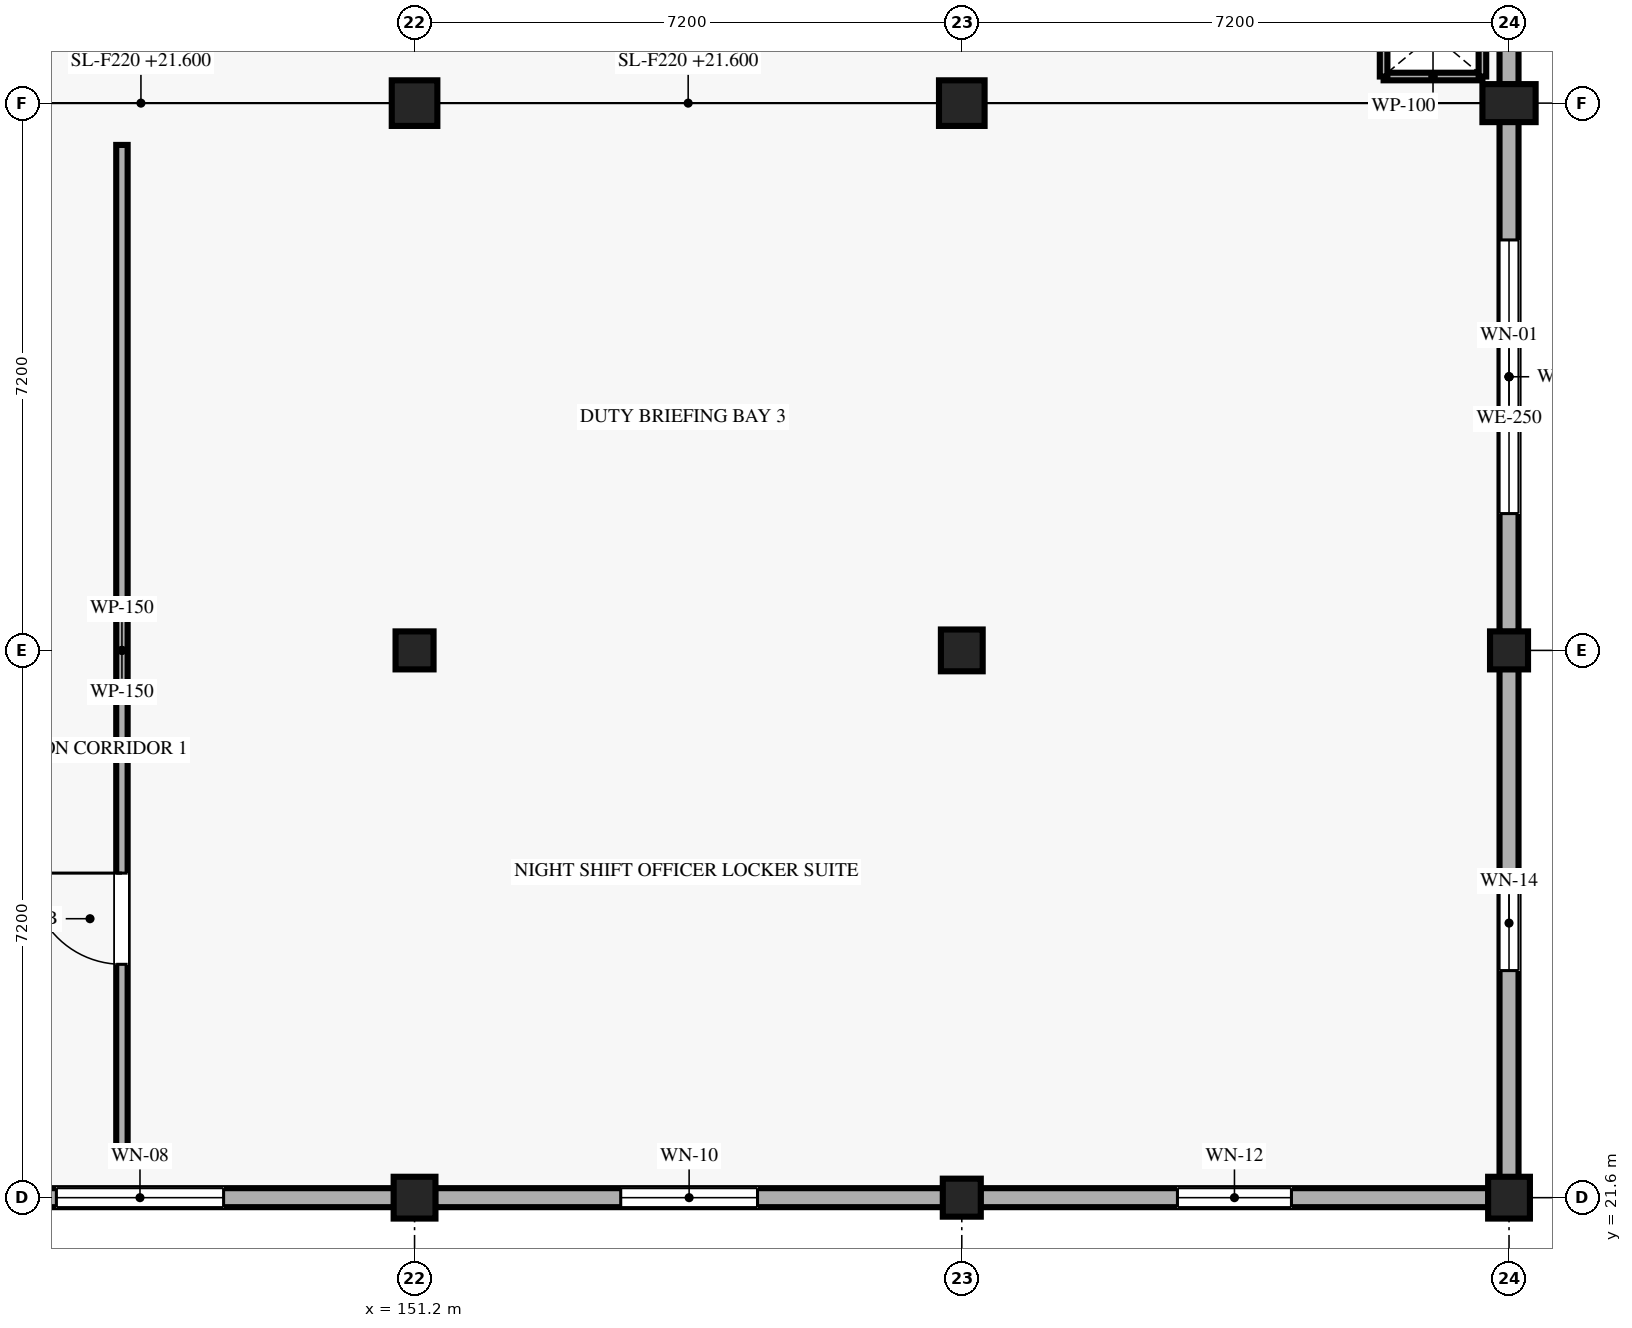
"""IFC4 building model, lengths in metres.
Left out: names, types, materials, properties, quantities, classifications, styles, units other than length and angle.
Written with IfcOpenShell. Run it as: python <this file> out.ifc"""

import sys

from ifc_helpers import new_model, si_unit, direction, frame, frame_2d, origin, origin_2d, place, context, subcontext, project, spatial, rectangle, extrude, element, fill, save


model = new_model("IFC4")
c1 = context("Model", 3, precision=1e-05, world=origin(), true_north=direction((0.0, 1.0)))
c2 = subcontext(c1, "Body", "Model", "MODEL_VIEW")
j1 = project(units=[si_unit("LENGTHUNIT", "METRE"), si_unit("PLANEANGLEUNIT", "RADIAN")], contexts=[c1])
p1 = place(None, origin())
s1 = spatial("IfcSite", under=j1, at=p1, CompositionType="ELEMENT")
p2 = place(p1, origin())
s2 = spatial("IfcBuilding", under=s1, at=p2, CompositionType="ELEMENT")
p3 = place(p2, frame((0.0, 0.0, 21.6)))
s3 = spatial("IfcBuildingStorey", under=s2, at=p3, CompositionType="ELEMENT", Elevation=21.6)
p4 = place(p3, frame((151.2, 21.6, 0.0), z_axis=(0.0, 0.0, 1.0), x_axis=(1.0, 0.0, 0.0)))
e1 = element("IfcColumn", 1, at=p4, inside=s3, PredefinedType="COLUMN", context=c2, shape_type="SweptSolid", body=[
    extrude(rectangle(XDim=0.55, YDim=0.55, at=origin_2d()), origin(), (0.0, 0.0, 1.0), 4.05),
])
p5 = place(p3, frame((151.2, 28.8, 0.0), z_axis=(0.0, 0.0, 1.0), x_axis=(1.0, 0.0, 0.0)))
e2 = element("IfcColumn", 2, at=p5, inside=s3, PredefinedType="COLUMN", context=c2, shape_type="SweptSolid", body=[
    extrude(rectangle(XDim=0.5, YDim=0.5, at=origin_2d()), origin(), (0.0, 0.0, 1.0), 4.05),
])
p6 = place(p3, frame((151.2, 36.0, 0.0), z_axis=(0.0, 0.0, 1.0), x_axis=(1.0, 0.0, 0.0)))
e3 = element("IfcColumn", 3, at=p6, inside=s3, PredefinedType="COLUMN", context=c2, shape_type="SweptSolid", body=[
    extrude(rectangle(XDim=0.6, YDim=0.6, at=origin_2d()), origin(), (0.0, 0.0, 1.0), 4.05),
])
p7 = place(p3, frame((158.4, 21.6, 0.0), z_axis=(0.0, 0.0, 1.0), x_axis=(1.0, 0.0, 0.0)))
e4 = element("IfcColumn", 4, at=p7, inside=s3, PredefinedType="COLUMN", context=c2, shape_type="SweptSolid", body=[
    extrude(rectangle(XDim=0.5, YDim=0.5, at=origin_2d()), origin(), (0.0, 0.0, 1.0), 4.05),
])
p8 = place(p3, frame((158.4, 28.8, 0.0), z_axis=(0.0, 0.0, 1.0), x_axis=(1.0, 0.0, 0.0)))
e5 = element("IfcColumn", 5, at=p8, inside=s3, PredefinedType="COLUMN", context=c2, shape_type="SweptSolid", body=[
    extrude(rectangle(XDim=0.55, YDim=0.55, at=origin_2d()), origin(), (0.0, 0.0, 1.0), 4.05),
])
p9 = place(p3, frame((158.4, 36.0, 0.0), z_axis=(0.0, 0.0, 1.0), x_axis=(1.0, 0.0, 0.0)))
e6 = element("IfcColumn", 6, at=p9, inside=s3, PredefinedType="COLUMN", context=c2, shape_type="SweptSolid", body=[
    extrude(rectangle(XDim=0.6, YDim=0.6, at=origin_2d()), origin(), (0.0, 0.0, 1.0), 4.05),
])
p10 = place(p3, frame((165.6, 21.6, 0.0), z_axis=(0.0, 0.0, 1.0), x_axis=(1.0, 0.0, 0.0)))
e7 = element("IfcColumn", 7, at=p10, inside=s3, PredefinedType="COLUMN", context=c2, shape_type="SweptSolid", body=[
    extrude(rectangle(XDim=0.55, YDim=0.55, at=origin_2d()), origin(), (0.0, 0.0, 1.0), 4.05),
])
p11 = place(p3, frame((165.6, 28.8, 0.0), z_axis=(0.0, 0.0, 1.0), x_axis=(1.0, 0.0, 0.0)))
e8 = element("IfcColumn", 8, at=p11, inside=s3, PredefinedType="COLUMN", context=c2, shape_type="SweptSolid", body=[
    extrude(rectangle(XDim=0.5, YDim=0.5, at=origin_2d()), origin(), (0.0, 0.0, 1.0), 4.05),
])
p12 = place(p3, frame((165.6, 36.0, 0.0), z_axis=(0.0, 0.0, 1.0), x_axis=(0.0, 1.0, 0.0)))
e9 = element("IfcColumn", 9, at=p12, inside=s3, PredefinedType="COLUMN", context=c2, shape_type="SweptSolid", body=[
    extrude(rectangle(XDim=0.5, YDim=0.7, at=origin_2d()), origin(), (0.0, 0.0, 1.0), 4.05),
])
p13 = place(p3, frame((144.245, 21.6, 0.0), z_axis=(0.0, 0.0, 1.0), x_axis=(1.0, 0.0, 0.0)))
e10 = element("IfcWall", 10, at=p13, inside=s3, PredefinedType="SOLIDWALL", context=c2, shape_type="SweptSolid", body=[
    extrude(rectangle(XDim=6.685, YDim=0.25, at=frame_2d((3.342, 0.0))), origin(), (0.0, 0.0, 1.0), 3.295),
])
p14 = place(p13, frame((2.242, 0.0, 0.85)))
e11 = element("IfcOpeningElement", 11, at=p14, cuts=e10, PredefinedType="OPENING", context=c2, shape_type="SweptSolid", body=[
    extrude(rectangle(XDim=2.2, YDim=1.7, at=frame_2d((1.1, 0.85))), frame((0.0, 0.135, 0.0), z_axis=(0.0, -1.0, 0.0), x_axis=(1.0, 0.0, 0.0)), (0.0, 0.0, 1.0), 0.27),
])
p15 = place(p3, frame((151.47, 21.6, 0.0), z_axis=(0.0, 0.0, 1.0), x_axis=(1.0, 0.0, 0.0)))
e12 = element("IfcWall", 12, at=p15, inside=s3, PredefinedType="SOLIDWALL", context=c2, shape_type="SweptSolid", body=[
    extrude(rectangle(XDim=6.685, YDim=0.25, at=frame_2d((3.343, 0.0))), origin(), (0.0, 0.0, 1.0), 3.295),
])
p16 = place(p15, frame((2.442, 0.0, 0.85)))
e13 = element("IfcOpeningElement", 13, at=p16, cuts=e12, PredefinedType="OPENING", context=c2, shape_type="SweptSolid", body=[
    extrude(rectangle(XDim=1.8, YDim=1.6, at=frame_2d((0.9, 0.8))), frame((0.0, 0.135, 0.0), z_axis=(0.0, -1.0, 0.0), x_axis=(1.0, 0.0, 0.0)), (0.0, 0.0, 1.0), 0.27),
])
p17 = place(p3, frame((158.645, 21.6, 0.0), z_axis=(0.0, 0.0, 1.0), x_axis=(1.0, 0.0, 0.0)))
e14 = element("IfcWall", 14, at=p17, inside=s3, PredefinedType="SOLIDWALL", context=c2, shape_type="SweptSolid", body=[
    extrude(rectangle(XDim=6.685, YDim=0.25, at=frame_2d((3.343, 0.0))), origin(), (0.0, 0.0, 1.0), 3.295),
])
p18 = place(p17, frame((2.593, 0.0, 0.85)))
e15 = element("IfcOpeningElement", 15, at=p18, cuts=e14, PredefinedType="OPENING", context=c2, shape_type="SweptSolid", body=[
    extrude(rectangle(XDim=1.5, YDim=2.05, at=frame_2d((0.75, 1.025))), frame((0.0, 0.135, 0.0), z_axis=(0.0, -1.0, 0.0), x_axis=(1.0, 0.0, 0.0)), (0.0, 0.0, 1.0), 0.27),
])
p19 = place(p3, frame((165.6, 21.87, 0.0), z_axis=(0.0, 0.0, 1.0), x_axis=(0.0, 1.0, 0.0)))
e16 = element("IfcWall", 16, at=p19, inside=s3, PredefinedType="SOLIDWALL", context=c2, shape_type="SweptSolid", body=[
    extrude(rectangle(XDim=6.685, YDim=0.25, at=frame_2d((3.342, 0.0))), origin(), (0.0, 0.0, 1.0), 3.295),
])
p20 = place(p19, frame((2.718, 0.0, 0.85)))
e17 = element("IfcOpeningElement", 17, at=p20, cuts=e16, PredefinedType="OPENING", context=c2, shape_type="SweptSolid", body=[
    extrude(rectangle(XDim=1.25, YDim=1.5, at=frame_2d((0.625, 0.75))), frame((0.0, 0.135, 0.0), z_axis=(0.0, -1.0, 0.0), x_axis=(1.0, 0.0, 0.0)), (0.0, 0.0, 1.0), 0.27),
])
p21 = place(p3, frame((165.6, 29.045, 0.0), z_axis=(0.0, 0.0, 1.0), x_axis=(0.0, 1.0, 0.0)))
e18 = element("IfcWall", 18, at=p21, inside=s3, PredefinedType="SOLIDWALL", context=c2, shape_type="SweptSolid", body=[
    extrude(rectangle(XDim=6.71, YDim=0.25, at=frame_2d((3.355, 0.0))), origin(), (0.0, 0.0, 1.0), 3.295),
])
p22 = place(p21, frame((1.555, 0.0, 0.85)))
e19 = element("IfcOpeningElement", 19, at=p22, cuts=e18, PredefinedType="OPENING", context=c2, shape_type="SweptSolid", body=[
    extrude(rectangle(XDim=3.6, YDim=2.05, at=frame_2d((1.8, 1.025))), frame((0.0, 0.135, 0.0), z_axis=(0.0, -1.0, 0.0), x_axis=(1.0, 0.0, 0.0)), (0.0, 0.0, 1.0), 0.27),
])
p23 = place(p3, frame((165.6, 36.245, 0.0), z_axis=(0.0, 0.0, 1.0), x_axis=(0.0, 1.0, 0.0)))
e20 = element("IfcWall", 20, at=p23, inside=s3, PredefinedType="SOLIDWALL", context=c2, shape_type="SweptSolid", body=[
    extrude(rectangle(XDim=3.185, YDim=0.25, at=frame_2d((1.592, 0.0))), origin(), (0.0, 0.0, 1.0), 3.295),
])
p24 = place(p23, frame((0.968, 0.0, 0.85)))
e21 = element("IfcOpeningElement", 21, at=p24, cuts=e20, PredefinedType="OPENING", context=c2, shape_type="SweptSolid", body=[
    extrude(rectangle(XDim=1.25, YDim=1.5, at=frame_2d((0.625, 0.75))), frame((0.0, 0.135, 0.0), z_axis=(0.0, -1.0, 0.0), x_axis=(1.0, 0.0, 0.0)), (0.0, 0.0, 1.0), 0.27),
])
p25 = place(p3, frame((163.95, 36.35, 0.0), z_axis=(0.0, 0.0, 1.0), x_axis=(1.0, 0.0, 0.0)))
e22 = element("IfcWall", 22, at=p25, inside=s3, PredefinedType="PARTITIONING", context=c2, shape_type="SweptSolid", body=[
    extrude(rectangle(XDim=1.3, YDim=0.1, at=frame_2d((0.65, 0.0))), origin(), (0.0, 0.0, 1.0), 3.3),
])
p26 = place(p3, frame((163.95, 36.35, 0.0), z_axis=(0.0, 0.0, 1.0), x_axis=(0.0, 1.0, 0.0)))
e23 = element("IfcWall", 23, at=p26, inside=s3, PredefinedType="PARTITIONING", context=c2, shape_type="SweptSolid", body=[
    extrude(rectangle(XDim=1.1, YDim=0.1, at=frame_2d((0.55, 0.0))), origin(), (0.0, 0.0, 1.0), 3.83),
])
p27 = place(p3, frame((165.25, 36.35, 0.0), z_axis=(0.0, 0.0, 1.0), x_axis=(0.0, 1.0, 0.0)))
e24 = element("IfcWall", 24, at=p27, inside=s3, PredefinedType="PARTITIONING", context=c2, shape_type="SweptSolid", body=[
    extrude(rectangle(XDim=1.1, YDim=0.1, at=frame_2d((0.55, 0.0))), origin(), (0.0, 0.0, 1.0), 3.3),
])
p28 = place(p3, frame((147.35, 36.55, 0.0), z_axis=(0.0, 0.0, 1.0), x_axis=(0.0, 1.0, 0.0)))
e25 = element("IfcWall", 25, at=p28, inside=s3, PredefinedType="PARTITIONING", context=c2, shape_type="SweptSolid", body=[
    extrude(rectangle(XDim=15.95, YDim=0.12, at=frame_2d((7.975, 0.0))), origin(), (0.0, 0.0, 1.0), 3.83),
])
p29 = place(p28, frame((2.25, 0.0, 0.0)))
e26 = element("IfcOpeningElement", 26, at=p29, cuts=e25, PredefinedType="OPENING", context=c2, shape_type="SweptSolid", body=[
    extrude(rectangle(XDim=1.7, YDim=2.2, at=frame_2d((0.85, 1.1))), frame((0.0, 0.07, 0.0), z_axis=(0.0, -1.0, 0.0), x_axis=(1.0, 0.0, 0.0)), (0.0, 0.0, 1.0), 0.14),
])
p30 = place(p3, frame((147.35, 22.15, 0.0), z_axis=(0.0, 0.0, 1.0), x_axis=(0.0, 1.0, 0.0)))
e27 = element("IfcWall", 27, at=p30, inside=s3, PredefinedType="PARTITIONING", context=c2, shape_type="SweptSolid", body=[
    extrude(rectangle(XDim=13.3, YDim=0.15, at=frame_2d((6.65, 0.0))), origin(), (0.0, 0.0, 1.0), 3.83),
])
p31 = place(p30, frame((2.52, 0.0, 0.0)))
e28 = element("IfcOpeningElement", 28, at=p31, cuts=e27, PredefinedType="OPENING", context=c2, shape_type="SweptSolid", body=[
    extrude(rectangle(XDim=1.2, YDim=2.15, at=frame_2d((0.6, 1.075))), frame((0.0, 0.085, 0.0), z_axis=(0.0, -1.0, 0.0), x_axis=(1.0, 0.0, 0.0)), (0.0, 0.0, 1.0), 0.17),
])
p32 = place(p14, origin())
e29 = element("IfcWindow", 29, at=p32, inside=s3, PartitioningType="SINGLE_PANEL", PredefinedType="WINDOW", context=c2, shape_type="SweptSolid", body=[
    extrude(rectangle(XDim=2.2, YDim=1.7, at=frame_2d((1.1, 0.85))), frame((0.0, 0.03, 0.0), z_axis=(0.0, -1.0, 0.0), x_axis=(1.0, 0.0, 0.0)), (0.0, 0.0, 1.0), 0.06),
])
fill(e11, e29)
p33 = place(p16, origin())
e30 = element("IfcWindow", 30, at=p33, inside=s3, PartitioningType="SINGLE_PANEL", PredefinedType="WINDOW", context=c2, shape_type="SweptSolid", body=[
    extrude(rectangle(XDim=1.8, YDim=1.6, at=frame_2d((0.9, 0.8))), frame((0.0, 0.03, 0.0), z_axis=(0.0, -1.0, 0.0), x_axis=(1.0, 0.0, 0.0)), (0.0, 0.0, 1.0), 0.06),
])
fill(e13, e30)
p34 = place(p18, origin())
e31 = element("IfcWindow", 31, at=p34, inside=s3, PartitioningType="SINGLE_PANEL", PredefinedType="WINDOW", context=c2, shape_type="SweptSolid", body=[
    extrude(rectangle(XDim=1.5, YDim=2.05, at=frame_2d((0.75, 1.025))), frame((0.0, 0.03, 0.0), z_axis=(0.0, -1.0, 0.0), x_axis=(1.0, 0.0, 0.0)), (0.0, 0.0, 1.0), 0.06),
])
fill(e15, e31)
p35 = place(p20, origin())
e32 = element("IfcWindow", 32, at=p35, inside=s3, PartitioningType="SINGLE_PANEL", PredefinedType="WINDOW", context=c2, shape_type="SweptSolid", body=[
    extrude(rectangle(XDim=1.25, YDim=1.5, at=frame_2d((0.625, 0.75))), frame((0.0, 0.03, 0.0), z_axis=(0.0, -1.0, 0.0), x_axis=(1.0, 0.0, 0.0)), (0.0, 0.0, 1.0), 0.06),
])
fill(e17, e32)
p36 = place(p22, origin())
e33 = element("IfcWindow", 33, at=p36, inside=s3, PartitioningType="SINGLE_PANEL", PredefinedType="WINDOW", context=c2, shape_type="SweptSolid", body=[
    extrude(rectangle(XDim=3.6, YDim=2.05, at=frame_2d((1.8, 1.025))), frame((0.0, 0.03, 0.0), z_axis=(0.0, -1.0, 0.0), x_axis=(1.0, 0.0, 0.0)), (0.0, 0.0, 1.0), 0.06),
])
fill(e19, e33)
p37 = place(p31, origin())
e34 = element("IfcDoor", 34, at=p37, inside=s3, OperationType="SINGLE_SWING_RIGHT", PredefinedType="DOOR", context=c2, shape_type="SweptSolid", body=[
    extrude(rectangle(XDim=1.2, YDim=2.15, at=frame_2d((0.6, 1.075))), frame((0.0, 0.025, 0.0), z_axis=(0.0, -1.0, 0.0), x_axis=(1.0, 0.0, 0.0)), (0.0, 0.0, 1.0), 0.05),
])
fill(e28, e34)
save(model, sys.argv[1])
